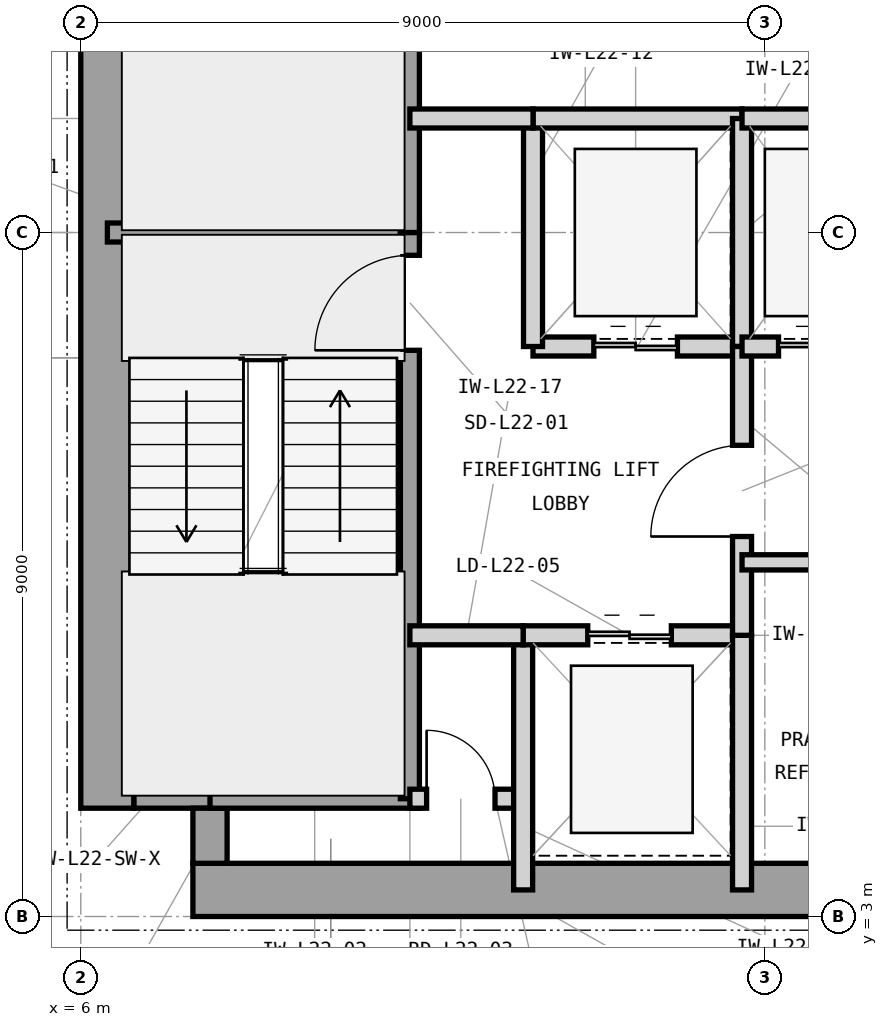
"""IFC4 building model, lengths in metres.
Left out: names, types, materials, properties, quantities, classifications, styles, units other than length and angle.
Written with IfcOpenShell. Run it as: python <this file> out.ifc"""

import sys

from ifc_helpers import new_model, si_unit, direction, frame, frame_2d, origin, place, context, subcontext, project, spatial, rectangle, extrude, element, fill, save


model = new_model("IFC4")
c1 = context("Model", 3, precision=1e-05, world=origin(), true_north=direction((0.0, 1.0)))
c2 = subcontext(c1, "Body", "Model", "MODEL_VIEW")
j1 = project(units=[si_unit("LENGTHUNIT", "METRE"), si_unit("PLANEANGLEUNIT", "RADIAN")], contexts=[c1])
p1 = place(None, origin())
s1 = spatial("IfcSite", under=j1, at=p1, CompositionType="ELEMENT")
p2 = place(p1, origin())
s2 = spatial("IfcBuilding", under=s1, at=p2, CompositionType="ELEMENT")
p3 = place(p2, frame((0.0, 0.0, 97.2)))
s3 = spatial("IfcBuildingStorey", under=s2, at=p3, CompositionType="ELEMENT", Elevation=97.2)
p4 = place(p3, frame((7.475, 3.35, 0.0), z_axis=(0.0, 0.0, 1.0), x_axis=(1.0, 0.0, 0.0)))
e1 = element("IfcWall", 1, at=p4, inside=s3, PredefinedType="SHEAR", context=c2, shape_type="SweptSolid", body=[
    extrude(rectangle(XDim=16.525, YDim=0.7, at=frame_2d((8.262, 0.0))), origin(), (0.0, 0.0, 1.0), 3.9),
])
p5 = place(p3, frame((6.35, 4.425, 0.0), z_axis=(0.0, 0.0, 1.0), x_axis=(0.0, 1.0, 0.0)))
e2 = element("IfcWall", 2, at=p5, inside=s3, PredefinedType="SHEAR", context=c2, shape_type="SweptSolid", body=[
    extrude(rectangle(XDim=15.15, YDim=0.7, at=frame_2d((7.575, 0.0))), origin(), (0.0, 0.0, 1.0), 3.9),
])
p6 = place(p3, frame((6.7, 4.65, 0.0), z_axis=(0.0, 0.0, 1.0), x_axis=(1.0, 0.0, 0.0)))
e3 = element("IfcWall", 3, at=p6, inside=s3, PredefinedType="SHEAR", context=c2, shape_type="SweptSolid", body=[
    extrude(rectangle(XDim=1.225, YDim=0.45, at=frame_2d((0.613, 0.0))), origin(), (0.0, 0.0, 1.0), 3.9),
])
p7 = place(p3, frame((7.7, 3.7, 0.0), z_axis=(0.0, 0.0, 1.0), x_axis=(0.0, 1.0, 0.0)))
e4 = element("IfcWall", 4, at=p7, inside=s3, PredefinedType="SHEAR", context=c2, shape_type="SweptSolid", body=[
    extrude(rectangle(XDim=0.725, YDim=0.45, at=frame_2d((0.363, 0.0))), origin(), (0.0, 0.0, 1.0), 3.9),
])
p8 = place(p3, frame((6.35, 12.0, 0.0), z_axis=(0.0, 0.0, 1.0), x_axis=(1.0, 0.0, 0.0)))
e5 = element("IfcWall", 5, at=p8, inside=s3, PredefinedType="SHEAR", context=c2, shape_type="SweptSolid", body=[
    extrude(rectangle(XDim=4.105, YDim=0.25, at=frame_2d((2.052, 0.0))), origin(), (0.0, 0.0, 1.0), 3.9),
])
p9 = place(p3, frame((7.7, 4.55, 0.0), z_axis=(0.0, 0.0, 1.0), x_axis=(1.0, 0.0, 0.0)))
e6 = element("IfcWall", 6, at=p9, inside=s3, PredefinedType="SHEAR", context=c2, shape_type="SweptSolid", body=[
    extrude(rectangle(XDim=2.755, YDim=0.25, at=frame_2d((1.377, 0.0))), origin(), (0.0, 0.0, 1.0), 3.9),
])
p10 = place(p3, frame((10.33, 4.55, 0.0), z_axis=(0.0, 0.0, 1.0), x_axis=(0.0, 1.0, 0.0)))
e7 = element("IfcWall", 7, at=p10, inside=s3, PredefinedType="SHEAR", context=c2, shape_type="SweptSolid", body=[
    extrude(rectangle(XDim=7.45, YDim=0.25, at=frame_2d((3.725, 0.0))), origin(), (0.0, 0.0, 1.0), 3.9),
])
p11 = place(p10, frame((5.9, 0.0, 0.0)))
e8 = element("IfcOpeningElement", 8, at=p11, cuts=e7, PredefinedType="OPENING", context=c2, shape_type="SweptSolid", body=[
    extrude(rectangle(XDim=1.25, YDim=2.2, at=frame_2d((0.625, 1.1))), frame((0.0, 0.135, 0.0), z_axis=(0.0, -1.0, 0.0), x_axis=(1.0, 0.0, 0.0)), (0.0, 0.0, 1.0), 0.27),
])
p12 = place(p3, frame((10.33, 12.0, 0.0), z_axis=(0.0, 0.0, 1.0), x_axis=(0.0, 1.0, 0.0)))
e9 = element("IfcWall", 9, at=p12, inside=s3, PredefinedType="SHEAR", context=c2, shape_type="SweptSolid", body=[
    extrude(rectangle(XDim=7.45, YDim=0.25, at=frame_2d((3.725, 0.0))), origin(), (0.0, 0.0, 1.0), 3.9),
])
p13 = place(p12, frame((5.85, 0.0, 0.0)))
e10 = element("IfcOpeningElement", 10, at=p13, cuts=e9, PredefinedType="OPENING", context=c2, shape_type="SweptSolid", body=[
    extrude(rectangle(XDim=1.25, YDim=2.2, at=frame_2d((0.625, 1.1))), frame((0.0, 0.135, 0.0), z_axis=(0.0, -1.0, 0.0), x_axis=(1.0, 0.0, 0.0)), (0.0, 0.0, 1.0), 0.27),
])
p14 = place(p3, frame((10.33, 4.55, 0.0), z_axis=(0.0, 0.0, 1.0), x_axis=(1.0, 0.0, 0.0)))
e11 = element("IfcWall", 11, at=p14, inside=s3, PredefinedType="PARTITIONING", context=c2, shape_type="SweptSolid", body=[
    extrude(rectangle(XDim=1.49, YDim=0.25, at=frame_2d((0.745, 0.0))), origin(), (0.0, 0.0, 1.0), 3.69),
])
p15 = place(p14, frame((0.22, 0.0, 0.0)))
e12 = element("IfcOpeningElement", 12, at=p15, cuts=e11, PredefinedType="OPENING", context=c2, shape_type="SweptSolid", body=[
    extrude(rectangle(XDim=0.9, YDim=2.1, at=frame_2d((0.45, 1.05))), frame((0.0, 0.135, 0.0), z_axis=(0.0, -1.0, 0.0), x_axis=(1.0, 0.0, 0.0)), (0.0, 0.0, 1.0), 0.27),
])
p16 = place(p3, frame((11.82, 3.35, 0.0), z_axis=(0.0, 0.0, 1.0), x_axis=(0.0, 1.0, 0.0)))
e13 = element("IfcWall", 13, at=p16, inside=s3, PredefinedType="PARTITIONING", context=c2, shape_type="SweptSolid", body=[
    extrude(rectangle(XDim=3.35, YDim=0.25, at=frame_2d((1.675, 0.0))), origin(), (0.0, 0.0, 1.0), 3.69),
])
p17 = place(p3, frame((11.82, 6.7, 0.0), z_axis=(0.0, 0.0, 1.0), x_axis=(1.0, 0.0, 0.0)))
e14 = element("IfcWall", 14, at=p17, inside=s3, PredefinedType="PARTITIONING", context=c2, shape_type="SweptSolid", body=[
    extrude(rectangle(XDim=2.88, YDim=0.25, at=frame_2d((1.44, 0.0))), origin(), (0.0, 0.0, 1.0), 3.227),
])
p18 = place(p17, frame((0.85, 0.0, 0.0)))
e15 = element("IfcOpeningElement", 15, at=p18, cuts=e14, PredefinedType="OPENING", context=c2, shape_type="SweptSolid", body=[
    extrude(rectangle(XDim=1.1, YDim=2.25, at=frame_2d((0.55, 1.125))), frame((0.0, 0.135, 0.0), z_axis=(0.0, -1.0, 0.0), x_axis=(1.0, 0.0, 0.0)), (0.0, 0.0, 1.0), 0.27),
])
p19 = place(p3, frame((14.7, 3.35, 0.0), z_axis=(0.0, 0.0, 1.0), x_axis=(0.0, 1.0, 0.0)))
e16 = element("IfcWall", 16, at=p19, inside=s3, PredefinedType="PARTITIONING", context=c2, shape_type="SweptSolid", body=[
    extrude(rectangle(XDim=3.35, YDim=0.25, at=frame_2d((1.675, 0.0))), origin(), (0.0, 0.0, 1.0), 3.69),
])
p20 = place(p3, frame((11.95, 10.5, 0.0), z_axis=(0.0, 0.0, 1.0), x_axis=(1.0, 0.0, 0.0)))
e17 = element("IfcWall", 17, at=p20, inside=s3, PredefinedType="PARTITIONING", context=c2, shape_type="SweptSolid", body=[
    extrude(rectangle(XDim=2.75, YDim=0.25, at=frame_2d((1.375, 0.0))), origin(), (0.0, 0.0, 1.0), 3.227),
])
p21 = place(p20, frame((0.8, 0.0, 0.0)))
e18 = element("IfcOpeningElement", 18, at=p21, cuts=e17, PredefinedType="OPENING", context=c2, shape_type="SweptSolid", body=[
    extrude(rectangle(XDim=1.1, YDim=2.25, at=frame_2d((0.55, 1.125))), frame((0.0, 0.135, 0.0), z_axis=(0.0, -1.0, 0.0), x_axis=(1.0, 0.0, 0.0)), (0.0, 0.0, 1.0), 0.27),
])
p22 = place(p3, frame((11.95, 10.5, 0.0), z_axis=(0.0, 0.0, 1.0), x_axis=(0.0, 1.0, 0.0)))
e19 = element("IfcWall", 19, at=p22, inside=s3, PredefinedType="PARTITIONING", context=c2, shape_type="SweptSolid", body=[
    extrude(rectangle(XDim=3.0, YDim=0.25, at=frame_2d((1.5, 0.0))), origin(), (0.0, 0.0, 1.0), 3.69),
])
p23 = place(p3, frame((11.95, 13.5, 0.0), z_axis=(0.0, 0.0, 1.0), x_axis=(1.0, 0.0, 0.0)))
e20 = element("IfcWall", 20, at=p23, inside=s3, PredefinedType="PARTITIONING", context=c2, shape_type="SweptSolid", body=[
    extrude(rectangle(XDim=2.75, YDim=0.25, at=frame_2d((1.375, 0.0))), origin(), (0.0, 0.0, 1.0), 3.227),
])
p24 = place(p3, frame((14.7, 10.5, 0.0), z_axis=(0.0, 0.0, 1.0), x_axis=(0.0, 1.0, 0.0)))
e21 = element("IfcWall", 21, at=p24, inside=s3, PredefinedType="PARTITIONING", context=c2, shape_type="SweptSolid", body=[
    extrude(rectangle(XDim=3.0, YDim=0.25, at=frame_2d((1.5, 0.0))), origin(), (0.0, 0.0, 1.0), 3.69),
])
p25 = place(p3, frame((14.7, 6.7, 0.0), z_axis=(0.0, 0.0, 1.0), x_axis=(0.0, 1.0, 0.0)))
e22 = element("IfcWall", 22, at=p25, inside=s3, PredefinedType="PARTITIONING", context=c2, shape_type="SweptSolid", body=[
    extrude(rectangle(XDim=3.8, YDim=0.25, at=frame_2d((1.9, 0.0))), origin(), (0.0, 0.0, 1.0), 3.69),
])
p26 = place(p25, frame((1.3, 0.0, 0.0)))
e23 = element("IfcOpeningElement", 23, at=p26, cuts=e22, PredefinedType="OPENING", context=c2, shape_type="SweptSolid", body=[
    extrude(rectangle(XDim=1.2, YDim=2.2, at=frame_2d((0.6, 1.1))), frame((0.0, 0.135, 0.0), z_axis=(0.0, -1.0, 0.0), x_axis=(1.0, 0.0, 0.0)), (0.0, 0.0, 1.0), 0.27),
])
p27 = place(p3, frame((10.33, 13.5, 0.0), z_axis=(0.0, 0.0, 1.0), x_axis=(1.0, 0.0, 0.0)))
e24 = element("IfcWall", 24, at=p27, inside=s3, PredefinedType="PARTITIONING", context=c2, shape_type="SweptSolid", body=[
    extrude(rectangle(XDim=1.62, YDim=0.25, at=frame_2d((0.81, 0.0))), origin(), (0.0, 0.0, 1.0), 3.227),
])
p28 = place(p3, frame((10.33, 6.7, 0.0), z_axis=(0.0, 0.0, 1.0), x_axis=(1.0, 0.0, 0.0)))
e25 = element("IfcWall", 25, at=p28, inside=s3, PredefinedType="PARTITIONING", context=c2, shape_type="SweptSolid", body=[
    extrude(rectangle(XDim=1.49, YDim=0.25, at=frame_2d((0.745, 0.0))), origin(), (0.0, 0.0, 1.0), 3.227),
])
p29 = place(p3, frame((14.7, 7.66, 0.0), z_axis=(0.0, 0.0, 1.0), x_axis=(1.0, 0.0, 0.0)))
e26 = element("IfcWall", 26, at=p29, inside=s3, PredefinedType="PARTITIONING", context=c2, shape_type="SweptSolid", body=[
    extrude(rectangle(XDim=3.15, YDim=0.2, at=frame_2d((1.575, 0.0))), origin(), (0.0, 0.0, 1.0), 3.69),
])
p30 = place(p29, frame((1.075, 0.0, 0.0)))
e27 = element("IfcOpeningElement", 27, at=p30, cuts=e26, PredefinedType="OPENING", context=c2, shape_type="SweptSolid", body=[
    extrude(rectangle(XDim=1.0, YDim=2.15, at=frame_2d((0.5, 1.075))), frame((0.0, 0.11, 0.0), z_axis=(0.0, -1.0, 0.0), x_axis=(1.0, 0.0, 0.0)), (0.0, 0.0, 1.0), 0.22),
])
p31 = place(p3, frame((14.7, 10.5, 0.0), z_axis=(0.0, 0.0, 1.0), x_axis=(1.0, 0.0, 0.0)))
e28 = element("IfcWall", 28, at=p31, inside=s3, PredefinedType="PARTITIONING", context=c2, shape_type="SweptSolid", body=[
    extrude(rectangle(XDim=2.15, YDim=0.25, at=frame_2d((1.075, 0.0))), origin(), (0.0, 0.0, 1.0), 3.227),
])
p32 = place(p31, frame((0.48, 0.0, 0.0)))
e29 = element("IfcOpeningElement", 29, at=p32, cuts=e28, PredefinedType="OPENING", context=c2, shape_type="SweptSolid", body=[
    extrude(rectangle(XDim=1.15, YDim=2.25, at=frame_2d((0.575, 1.125))), frame((0.0, 0.135, 0.0), z_axis=(0.0, -1.0, 0.0), x_axis=(1.0, 0.0, 0.0)), (0.0, 0.0, 1.0), 0.27),
])
p33 = place(p3, frame((14.7, 13.5, 0.0), z_axis=(0.0, 0.0, 1.0), x_axis=(1.0, 0.0, 0.0)))
e30 = element("IfcWall", 30, at=p33, inside=s3, PredefinedType="PARTITIONING", context=c2, shape_type="SweptSolid", body=[
    extrude(rectangle(XDim=8.95, YDim=0.25, at=frame_2d((4.475, 0.0))), origin(), (0.0, 0.0, 1.0), 3.227),
])
p34 = place(p11, origin())
e31 = element("IfcDoor", 31, at=p34, inside=s3, OperationType="SINGLE_SWING_LEFT", PredefinedType="DOOR", context=c2, shape_type="SweptSolid", body=[
    extrude(rectangle(XDim=1.25, YDim=2.2, at=frame_2d((0.625, 1.1))), frame((0.0, 0.025, 0.0), z_axis=(0.0, -1.0, 0.0), x_axis=(1.0, 0.0, 0.0)), (0.0, 0.0, 1.0), 0.05),
])
fill(e8, e31)
p35 = place(p15, origin())
e32 = element("IfcDoor", 32, at=p35, inside=s3, OperationType="SINGLE_SWING_LEFT", PredefinedType="TRAPDOOR", context=c2, shape_type="SweptSolid", body=[
    extrude(rectangle(XDim=0.9, YDim=2.1, at=frame_2d((0.45, 1.05))), frame((0.0, 0.025, 0.0), z_axis=(0.0, -1.0, 0.0), x_axis=(1.0, 0.0, 0.0)), (0.0, 0.0, 1.0), 0.05),
])
fill(e12, e32)
p36 = place(p18, origin())
e33 = element("IfcDoor", 33, at=p36, inside=s3, OperationType="DOUBLE_DOOR_SLIDING", PredefinedType="DOOR", context=c2, shape_type="SweptSolid", body=[
    extrude(rectangle(XDim=1.1, YDim=2.25, at=frame_2d((0.55, 1.125))), frame((0.0, 0.025, 0.0), z_axis=(0.0, -1.0, 0.0), x_axis=(1.0, 0.0, 0.0)), (0.0, 0.0, 1.0), 0.05),
])
fill(e15, e33)
p37 = place(p21, origin())
e34 = element("IfcDoor", 34, at=p37, inside=s3, OperationType="DOUBLE_DOOR_SLIDING", PredefinedType="DOOR", context=c2, shape_type="SweptSolid", body=[
    extrude(rectangle(XDim=1.1, YDim=2.25, at=frame_2d((0.55, 1.125))), frame((0.0, 0.025, 0.0), z_axis=(0.0, -1.0, 0.0), x_axis=(1.0, 0.0, 0.0)), (0.0, 0.0, 1.0), 0.05),
])
fill(e18, e34)
p38 = place(p26, origin())
e35 = element("IfcDoor", 35, at=p38, inside=s3, OperationType="SINGLE_SWING_LEFT", PredefinedType="DOOR", context=c2, shape_type="SweptSolid", body=[
    extrude(rectangle(XDim=1.2, YDim=2.2, at=frame_2d((0.6, 1.1))), frame((0.0, 0.025, 0.0), z_axis=(0.0, -1.0, 0.0), x_axis=(1.0, 0.0, 0.0)), (0.0, 0.0, 1.0), 0.05),
])
fill(e23, e35)
p39 = place(p32, origin())
e36 = element("IfcDoor", 36, at=p39, inside=s3, OperationType="DOUBLE_DOOR_SLIDING", PredefinedType="DOOR", context=c2, shape_type="SweptSolid", body=[
    extrude(rectangle(XDim=1.15, YDim=2.25, at=frame_2d((0.575, 1.125))), frame((0.0, 0.025, 0.0), z_axis=(0.0, -1.0, 0.0), x_axis=(1.0, 0.0, 0.0)), (0.0, 0.0, 1.0), 0.05),
])
fill(e29, e36)
save(model, sys.argv[1])
